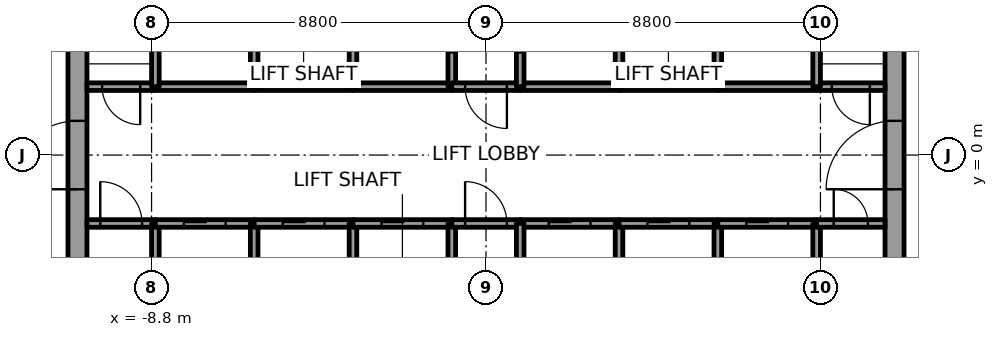
"""IFC4 building model, lengths in metres.
Left out: names, types, materials, properties, quantities, classifications, styles, units other than length and angle.
Written with IfcOpenShell. Run it as: python <this file> out.ifc"""

import sys

from ifc_helpers import new_model, si_unit, direction, frame, frame_2d, origin, place, context, subcontext, project, spatial, rectangle, extrude, element, fill, save


model = new_model("IFC4")
c1 = context("Model", 3, precision=1e-05, world=origin(), true_north=direction((0.0, 1.0)))
c2 = subcontext(c1, "Body", "Model", "MODEL_VIEW")
j1 = project(units=[si_unit("LENGTHUNIT", "METRE"), si_unit("PLANEANGLEUNIT", "RADIAN")], contexts=[c1])
p1 = place(None, origin())
s1 = spatial("IfcSite", under=j1, at=p1, CompositionType="ELEMENT")
p2 = place(p1, origin())
s2 = spatial("IfcBuilding", under=s1, at=p2, CompositionType="ELEMENT")
p3 = place(p2, frame((0.0, 0.0, 153.8)))
s3 = spatial("IfcBuildingStorey", under=s2, at=p3, CompositionType="ELEMENT", Elevation=153.8)
p4 = place(p3, frame((-10.75, -7.5, 0.0), z_axis=(0.0, 0.0, 1.0), x_axis=(0.0, 1.0, 0.0)))
e1 = element("IfcWall", 1, at=p4, inside=s3, PredefinedType="SHEAR", context=c2, shape_type="SweptSolid", body=[
    extrude(rectangle(XDim=15.0, YDim=0.5, at=frame_2d((7.5, 0.0))), origin(), (0.0, 0.0, 1.0), 4.0),
])
p5 = place(p4, frame((6.6, 0.0, 0.0)))
e2 = element("IfcOpeningElement", 2, at=p5, cuts=e1, PredefinedType="OPENING", context=c2, shape_type="SweptSolid", body=[
    extrude(rectangle(XDim=1.8, YDim=2.1, at=frame_2d((0.9, 1.05))), frame((0.0, 0.25, 0.0), z_axis=(0.0, -1.0, 0.0), x_axis=(1.0, 0.0, 0.0)), (0.0, 0.0, 1.0), 0.5),
])
p6 = place(p3, frame((10.75, -7.5, 0.0), z_axis=(0.0, 0.0, 1.0), x_axis=(0.0, 1.0, 0.0)))
e3 = element("IfcWall", 3, at=p6, inside=s3, PredefinedType="SHEAR", context=c2, shape_type="SweptSolid", body=[
    extrude(rectangle(XDim=15.0, YDim=0.5, at=frame_2d((7.5, 0.0))), origin(), (0.0, 0.0, 1.0), 4.0),
])
p7 = place(p6, frame((6.6, 0.0, 0.0)))
e4 = element("IfcOpeningElement", 4, at=p7, cuts=e3, PredefinedType="OPENING", context=c2, shape_type="SweptSolid", body=[
    extrude(rectangle(XDim=1.8, YDim=2.1, at=frame_2d((0.9, 1.05))), frame((0.0, 0.25, 0.0), z_axis=(0.0, -1.0, 0.0), x_axis=(1.0, 0.0, 0.0)), (0.0, 0.0, 1.0), 0.5),
])
p8 = place(p3, frame((-10.5, -1.8, 0.0), z_axis=(0.0, 0.0, 1.0), x_axis=(1.0, 0.0, 0.0)))
e5 = element("IfcWall", 5, at=p8, inside=s3, PredefinedType="SOLIDWALL", context=c2, shape_type="SweptSolid", body=[
    extrude(rectangle(XDim=1.8, YDim=0.2, at=frame_2d((0.9, 0.0))), origin(), (0.0, 0.0, 1.0), 3.85),
])
p9 = place(p8, frame((0.35, 0.0, 0.0)))
e6 = element("IfcOpeningElement", 6, at=p9, cuts=e5, PredefinedType="OPENING", context=c2, shape_type="SweptSolid", body=[
    extrude(rectangle(XDim=1.1, YDim=2.1, at=frame_2d((0.55, 1.05))), frame((0.0, 0.1, 0.0), z_axis=(0.0, -1.0, 0.0), x_axis=(1.0, 0.0, 0.0)), (0.0, 0.0, 1.0), 0.2),
])
p10 = place(p3, frame((-8.7, 1.8, 0.0), z_axis=(0.0, 0.0, 1.0), x_axis=(-1.0, 0.0, 0.0)))
e7 = element("IfcWall", 7, at=p10, inside=s3, PredefinedType="SOLIDWALL", context=c2, shape_type="SweptSolid", body=[
    extrude(rectangle(XDim=1.8, YDim=0.2, at=frame_2d((0.9, 0.0))), origin(), (0.0, 0.0, 1.0), 3.85),
])
p11 = place(p10, frame((0.4, 0.0, 0.0)))
e8 = element("IfcOpeningElement", 8, at=p11, cuts=e7, PredefinedType="OPENING", context=c2, shape_type="SweptSolid", body=[
    extrude(rectangle(XDim=1.0, YDim=2.1, at=frame_2d((0.5, 1.05))), frame((0.0, 0.1, 0.0), z_axis=(0.0, -1.0, 0.0), x_axis=(1.0, 0.0, 0.0)), (0.0, 0.0, 1.0), 0.2),
])
p12 = place(p3, frame((-8.7, -4.6, 0.0), z_axis=(0.0, 0.0, 1.0), x_axis=(0.0, 1.0, 0.0)))
e9 = element("IfcWall", 9, at=p12, inside=s3, PredefinedType="SOLIDWALL", context=c2, shape_type="SweptSolid", body=[
    extrude(rectangle(XDim=2.8, YDim=0.2, at=frame_2d((1.4, 0.0))), origin(), (0.0, 0.0, 1.0), 3.85),
])
p13 = place(p3, frame((-8.7, -1.8, 0.0), z_axis=(0.0, 0.0, 1.0), x_axis=(1.0, 0.0, 0.0)))
e10 = element("IfcWall", 10, at=p13, inside=s3, PredefinedType="SOLIDWALL", context=c2, shape_type="SweptSolid", body=[
    extrude(rectangle(XDim=2.6, YDim=0.2, at=frame_2d((1.3, 0.0))), origin(), (0.0, 0.0, 1.0), 3.85),
])
p14 = place(p13, frame((0.75, 0.0, 0.0)))
e11 = element("IfcOpeningElement", 11, at=p14, cuts=e10, PredefinedType="OPENING", context=c2, shape_type="SweptSolid", body=[
    extrude(rectangle(XDim=1.1, YDim=2.1, at=frame_2d((0.55, 1.05))), frame((0.0, 0.1, 0.0), z_axis=(0.0, -1.0, 0.0), x_axis=(1.0, 0.0, 0.0)), (0.0, 0.0, 1.0), 0.2),
])
p15 = place(p3, frame((-6.1, 1.8, 0.0), z_axis=(0.0, 0.0, 1.0), x_axis=(-1.0, 0.0, 0.0)))
e12 = element("IfcWall", 12, at=p15, inside=s3, PredefinedType="SOLIDWALL", context=c2, shape_type="SweptSolid", body=[
    extrude(rectangle(XDim=2.6, YDim=0.2, at=frame_2d((1.3, 0.0))), origin(), (0.0, 0.0, 1.0), 3.85),
])
for number, where, z_axis, x_axis in (
    (13, (-8.7, 1.8, 0.0), (0.0, 0.0, 1.0), (0.0, 1.0, 0.0)),
    (14, (-6.1, -4.6, 0.0), (0.0, 0.0, 1.0), (0.0, 1.0, 0.0)),
):
    element("IfcWall", number, at=place(p3, frame(where, z_axis=z_axis, x_axis=x_axis)), inside=s3, PredefinedType="SOLIDWALL", context=c2, shape_type="SweptSolid", body=[
        extrude(rectangle(XDim=2.8, YDim=0.2, at=frame_2d((1.4, 0.0))), origin(), (0.0, 0.0, 1.0), 3.85),
    ])
p16 = place(p3, frame((-6.1, -1.8, 0.0), z_axis=(0.0, 0.0, 1.0), x_axis=(1.0, 0.0, 0.0)))
e15 = element("IfcWall", 15, at=p16, inside=s3, PredefinedType="SOLIDWALL", context=c2, shape_type="SweptSolid", body=[
    extrude(rectangle(XDim=2.6, YDim=0.2, at=frame_2d((1.3, 0.0))), origin(), (0.0, 0.0, 1.0), 3.85),
])
p17 = place(p16, frame((0.75, 0.0, 0.0)))
e16 = element("IfcOpeningElement", 16, at=p17, cuts=e15, PredefinedType="OPENING", context=c2, shape_type="SweptSolid", body=[
    extrude(rectangle(XDim=1.1, YDim=2.1, at=frame_2d((0.55, 1.05))), frame((0.0, 0.1, 0.0), z_axis=(0.0, -1.0, 0.0), x_axis=(1.0, 0.0, 0.0)), (0.0, 0.0, 1.0), 0.2),
])
p18 = place(p3, frame((-3.5, 1.8, 0.0), z_axis=(0.0, 0.0, 1.0), x_axis=(-1.0, 0.0, 0.0)))
e17 = element("IfcWall", 17, at=p18, inside=s3, PredefinedType="SOLIDWALL", context=c2, shape_type="SweptSolid", body=[
    extrude(rectangle(XDim=2.6, YDim=0.2, at=frame_2d((1.3, 0.0))), origin(), (0.0, 0.0, 1.0), 3.85),
])
for number, where, z_axis, x_axis in (
    (18, (-6.1, 1.8, 0.0), (0.0, 0.0, 1.0), (0.0, 1.0, 0.0)),
    (19, (-3.5, -4.6, 0.0), (0.0, 0.0, 1.0), (0.0, 1.0, 0.0)),
):
    element("IfcWall", number, at=place(p3, frame(where, z_axis=z_axis, x_axis=x_axis)), inside=s3, PredefinedType="SOLIDWALL", context=c2, shape_type="SweptSolid", body=[
        extrude(rectangle(XDim=2.8, YDim=0.2, at=frame_2d((1.4, 0.0))), origin(), (0.0, 0.0, 1.0), 3.85),
    ])
p19 = place(p3, frame((-3.5, -1.8, 0.0), z_axis=(0.0, 0.0, 1.0), x_axis=(1.0, 0.0, 0.0)))
e20 = element("IfcWall", 20, at=p19, inside=s3, PredefinedType="SOLIDWALL", context=c2, shape_type="SweptSolid", body=[
    extrude(rectangle(XDim=2.6, YDim=0.2, at=frame_2d((1.3, 0.0))), origin(), (0.0, 0.0, 1.0), 3.85),
])
p20 = place(p19, frame((0.75, 0.0, 0.0)))
e21 = element("IfcOpeningElement", 21, at=p20, cuts=e20, PredefinedType="OPENING", context=c2, shape_type="SweptSolid", body=[
    extrude(rectangle(XDim=1.1, YDim=2.1, at=frame_2d((0.55, 1.05))), frame((0.0, 0.1, 0.0), z_axis=(0.0, -1.0, 0.0), x_axis=(1.0, 0.0, 0.0)), (0.0, 0.0, 1.0), 0.2),
])
p21 = place(p3, frame((-0.9, 1.8, 0.0), z_axis=(0.0, 0.0, 1.0), x_axis=(-1.0, 0.0, 0.0)))
e22 = element("IfcWall", 22, at=p21, inside=s3, PredefinedType="SOLIDWALL", context=c2, shape_type="SweptSolid", body=[
    extrude(rectangle(XDim=2.6, YDim=0.2, at=frame_2d((1.3, 0.0))), origin(), (0.0, 0.0, 1.0), 3.85),
])
p22 = place(p3, frame((-3.5, 4.6, 0.0), z_axis=(0.0, 0.0, 1.0), x_axis=(0.0, -1.0, 0.0)))
e23 = element("IfcWall", 23, at=p22, inside=s3, PredefinedType="SOLIDWALL", context=c2, shape_type="SweptSolid", body=[
    extrude(rectangle(XDim=2.8, YDim=0.2, at=frame_2d((1.4, 0.0))), origin(), (0.0, 0.0, 1.0), 3.85),
])
p23 = place(p3, frame((-0.9, 1.8, 0.0), z_axis=(0.0, 0.0, 1.0), x_axis=(0.0, 1.0, 0.0)))
e24 = element("IfcWall", 24, at=p23, inside=s3, PredefinedType="SOLIDWALL", context=c2, shape_type="SweptSolid", body=[
    extrude(rectangle(XDim=3.0, YDim=0.2, at=frame_2d((1.5, 0.0))), origin(), (0.0, 0.0, 1.0), 3.85),
])
p24 = place(p23, frame((0.9, 0.0, 0.0)))
e25 = element("IfcOpeningElement", 25, at=p24, cuts=e24, PredefinedType="OPENING", context=c2, shape_type="SweptSolid", body=[
    extrude(rectangle(XDim=1.2, YDim=2.1, at=frame_2d((0.6, 1.05))), frame((0.0, 0.1, 0.0), z_axis=(0.0, -1.0, 0.0), x_axis=(1.0, 0.0, 0.0)), (0.0, 0.0, 1.0), 0.2),
])
p25 = place(p3, frame((-0.9, -4.6, 0.0), z_axis=(0.0, 0.0, 1.0), x_axis=(0.0, 1.0, 0.0)))
e26 = element("IfcWall", 26, at=p25, inside=s3, PredefinedType="SOLIDWALL", context=c2, shape_type="SweptSolid", body=[
    extrude(rectangle(XDim=2.8, YDim=0.2, at=frame_2d((1.4, 0.0))), origin(), (0.0, 0.0, 1.0), 3.85),
])
p26 = place(p3, frame((-0.9, -1.8, 0.0), z_axis=(0.0, 0.0, 1.0), x_axis=(1.0, 0.0, 0.0)))
e27 = element("IfcWall", 27, at=p26, inside=s3, PredefinedType="SOLIDWALL", context=c2, shape_type="SweptSolid", body=[
    extrude(rectangle(XDim=1.8, YDim=0.2, at=frame_2d((0.9, 0.0))), origin(), (0.0, 0.0, 1.0), 3.85),
])
p27 = place(p26, frame((0.35, 0.0, 0.0)))
e28 = element("IfcOpeningElement", 28, at=p27, cuts=e27, PredefinedType="OPENING", context=c2, shape_type="SweptSolid", body=[
    extrude(rectangle(XDim=1.1, YDim=2.1, at=frame_2d((0.55, 1.05))), frame((0.0, 0.1, 0.0), z_axis=(0.0, -1.0, 0.0), x_axis=(1.0, 0.0, 0.0)), (0.0, 0.0, 1.0), 0.2),
])
p28 = place(p3, frame((0.9, 1.8, 0.0), z_axis=(0.0, 0.0, 1.0), x_axis=(-1.0, 0.0, 0.0)))
e29 = element("IfcWall", 29, at=p28, inside=s3, PredefinedType="SOLIDWALL", context=c2, shape_type="SweptSolid", body=[
    extrude(rectangle(XDim=1.8, YDim=0.2, at=frame_2d((0.9, 0.0))), origin(), (0.0, 0.0, 1.0), 3.85),
])
p29 = place(p28, frame((0.35, 0.0, 0.0)))
e30 = element("IfcOpeningElement", 30, at=p29, cuts=e29, PredefinedType="OPENING", context=c2, shape_type="SweptSolid", body=[
    extrude(rectangle(XDim=1.1, YDim=2.1, at=frame_2d((0.55, 1.05))), frame((0.0, 0.1, 0.0), z_axis=(0.0, -1.0, 0.0), x_axis=(1.0, 0.0, 0.0)), (0.0, 0.0, 1.0), 0.2),
])
p30 = place(p3, frame((0.9, -1.8, 0.0), z_axis=(0.0, 0.0, 1.0), x_axis=(1.0, 0.0, 0.0)))
e31 = element("IfcWall", 31, at=p30, inside=s3, PredefinedType="SOLIDWALL", context=c2, shape_type="SweptSolid", body=[
    extrude(rectangle(XDim=2.6, YDim=0.2, at=frame_2d((1.3, 0.0))), origin(), (0.0, 0.0, 1.0), 3.85),
])
p31 = place(p30, frame((0.75, 0.0, 0.0)))
e32 = element("IfcOpeningElement", 32, at=p31, cuts=e31, PredefinedType="OPENING", context=c2, shape_type="SweptSolid", body=[
    extrude(rectangle(XDim=1.1, YDim=2.1, at=frame_2d((0.55, 1.05))), frame((0.0, 0.1, 0.0), z_axis=(0.0, -1.0, 0.0), x_axis=(1.0, 0.0, 0.0)), (0.0, 0.0, 1.0), 0.2),
])
p32 = place(p3, frame((0.9, -1.8, 0.0), z_axis=(0.0, 0.0, 1.0), x_axis=(0.0, -1.0, 0.0)))
e33 = element("IfcWall", 33, at=p32, inside=s3, PredefinedType="SOLIDWALL", context=c2, shape_type="SweptSolid", body=[
    extrude(rectangle(XDim=2.8, YDim=0.2, at=frame_2d((1.4, 0.0))), origin(), (0.0, 0.0, 1.0), 3.85),
])
p33 = place(p3, frame((3.5, 1.8, 0.0), z_axis=(0.0, 0.0, 1.0), x_axis=(-1.0, 0.0, 0.0)))
e34 = element("IfcWall", 34, at=p33, inside=s3, PredefinedType="SOLIDWALL", context=c2, shape_type="SweptSolid", body=[
    extrude(rectangle(XDim=2.6, YDim=0.2, at=frame_2d((1.3, 0.0))), origin(), (0.0, 0.0, 1.0), 3.85),
])
p34 = place(p3, frame((0.9, 4.8, 0.0), z_axis=(0.0, 0.0, 1.0), x_axis=(0.0, -1.0, 0.0)))
e35 = element("IfcWall", 35, at=p34, inside=s3, PredefinedType="SOLIDWALL", context=c2, shape_type="SweptSolid", body=[
    extrude(rectangle(XDim=3.0, YDim=0.2, at=frame_2d((1.5, 0.0))), origin(), (0.0, 0.0, 1.0), 3.85),
])
p35 = place(p34, frame((0.9, 0.0, 0.0)))
e36 = element("IfcOpeningElement", 36, at=p35, cuts=e35, PredefinedType="OPENING", context=c2, shape_type="SweptSolid", body=[
    extrude(rectangle(XDim=1.2, YDim=2.1, at=frame_2d((0.6, 1.05))), frame((0.0, 0.1, 0.0), z_axis=(0.0, -1.0, 0.0), x_axis=(1.0, 0.0, 0.0)), (0.0, 0.0, 1.0), 0.2),
])
p36 = place(p3, frame((3.5, -4.6, 0.0), z_axis=(0.0, 0.0, 1.0), x_axis=(0.0, 1.0, 0.0)))
e37 = element("IfcWall", 37, at=p36, inside=s3, PredefinedType="SOLIDWALL", context=c2, shape_type="SweptSolid", body=[
    extrude(rectangle(XDim=2.8, YDim=0.2, at=frame_2d((1.4, 0.0))), origin(), (0.0, 0.0, 1.0), 3.85),
])
p37 = place(p3, frame((3.5, -1.8, 0.0), z_axis=(0.0, 0.0, 1.0), x_axis=(1.0, 0.0, 0.0)))
e38 = element("IfcWall", 38, at=p37, inside=s3, PredefinedType="SOLIDWALL", context=c2, shape_type="SweptSolid", body=[
    extrude(rectangle(XDim=2.6, YDim=0.2, at=frame_2d((1.3, 0.0))), origin(), (0.0, 0.0, 1.0), 3.85),
])
p38 = place(p37, frame((0.75, 0.0, 0.0)))
e39 = element("IfcOpeningElement", 39, at=p38, cuts=e38, PredefinedType="OPENING", context=c2, shape_type="SweptSolid", body=[
    extrude(rectangle(XDim=1.1, YDim=2.1, at=frame_2d((0.55, 1.05))), frame((0.0, 0.1, 0.0), z_axis=(0.0, -1.0, 0.0), x_axis=(1.0, 0.0, 0.0)), (0.0, 0.0, 1.0), 0.2),
])
p39 = place(p3, frame((6.1, 1.8, 0.0), z_axis=(0.0, 0.0, 1.0), x_axis=(-1.0, 0.0, 0.0)))
e40 = element("IfcWall", 40, at=p39, inside=s3, PredefinedType="SOLIDWALL", context=c2, shape_type="SweptSolid", body=[
    extrude(rectangle(XDim=2.6, YDim=0.2, at=frame_2d((1.3, 0.0))), origin(), (0.0, 0.0, 1.0), 3.85),
])
for number, where, z_axis, x_axis in (
    (41, (3.5, 1.8, 0.0), (0.0, 0.0, 1.0), (0.0, 1.0, 0.0)),
    (42, (6.1, -4.6, 0.0), (0.0, 0.0, 1.0), (0.0, 1.0, 0.0)),
):
    element("IfcWall", number, at=place(p3, frame(where, z_axis=z_axis, x_axis=x_axis)), inside=s3, PredefinedType="SOLIDWALL", context=c2, shape_type="SweptSolid", body=[
        extrude(rectangle(XDim=2.8, YDim=0.2, at=frame_2d((1.4, 0.0))), origin(), (0.0, 0.0, 1.0), 3.85),
    ])
p40 = place(p3, frame((6.1, -1.8, 0.0), z_axis=(0.0, 0.0, 1.0), x_axis=(1.0, 0.0, 0.0)))
e43 = element("IfcWall", 43, at=p40, inside=s3, PredefinedType="SOLIDWALL", context=c2, shape_type="SweptSolid", body=[
    extrude(rectangle(XDim=2.6, YDim=0.2, at=frame_2d((1.3, 0.0))), origin(), (0.0, 0.0, 1.0), 3.85),
])
p41 = place(p40, frame((0.75, 0.0, 0.0)))
e44 = element("IfcOpeningElement", 44, at=p41, cuts=e43, PredefinedType="OPENING", context=c2, shape_type="SweptSolid", body=[
    extrude(rectangle(XDim=1.1, YDim=2.1, at=frame_2d((0.55, 1.05))), frame((0.0, 0.1, 0.0), z_axis=(0.0, -1.0, 0.0), x_axis=(1.0, 0.0, 0.0)), (0.0, 0.0, 1.0), 0.2),
])
p42 = place(p3, frame((8.7, 1.8, 0.0), z_axis=(0.0, 0.0, 1.0), x_axis=(-1.0, 0.0, 0.0)))
e45 = element("IfcWall", 45, at=p42, inside=s3, PredefinedType="SOLIDWALL", context=c2, shape_type="SweptSolid", body=[
    extrude(rectangle(XDim=2.6, YDim=0.2, at=frame_2d((1.3, 0.0))), origin(), (0.0, 0.0, 1.0), 3.85),
])
for number, where, z_axis, x_axis in (
    (46, (6.1, 1.8, 0.0), (0.0, 0.0, 1.0), (0.0, 1.0, 0.0)),
    (47, (8.7, -1.8, 0.0), (0.0, 0.0, 1.0), (0.0, -1.0, 0.0)),
):
    element("IfcWall", number, at=place(p3, frame(where, z_axis=z_axis, x_axis=x_axis)), inside=s3, PredefinedType="SOLIDWALL", context=c2, shape_type="SweptSolid", body=[
        extrude(rectangle(XDim=2.8, YDim=0.2, at=frame_2d((1.4, 0.0))), origin(), (0.0, 0.0, 1.0), 3.85),
    ])
p43 = place(p3, frame((8.7, -1.8, 0.0), z_axis=(0.0, 0.0, 1.0), x_axis=(1.0, 0.0, 0.0)))
e48 = element("IfcWall", 48, at=p43, inside=s3, PredefinedType="SOLIDWALL", context=c2, shape_type="SweptSolid", body=[
    extrude(rectangle(XDim=1.8, YDim=0.2, at=frame_2d((0.9, 0.0))), origin(), (0.0, 0.0, 1.0), 3.85),
])
p44 = place(p43, frame((0.45, 0.0, 0.0)))
e49 = element("IfcOpeningElement", 49, at=p44, cuts=e48, PredefinedType="OPENING", context=c2, shape_type="SweptSolid", body=[
    extrude(rectangle(XDim=0.9, YDim=2.1, at=frame_2d((0.45, 1.05))), frame((0.0, 0.1, 0.0), z_axis=(0.0, -1.0, 0.0), x_axis=(1.0, 0.0, 0.0)), (0.0, 0.0, 1.0), 0.2),
])
p45 = place(p3, frame((10.5, 1.8, 0.0), z_axis=(0.0, 0.0, 1.0), x_axis=(-1.0, 0.0, 0.0)))
e50 = element("IfcWall", 50, at=p45, inside=s3, PredefinedType="SOLIDWALL", context=c2, shape_type="SweptSolid", body=[
    extrude(rectangle(XDim=1.8, YDim=0.2, at=frame_2d((0.9, 0.0))), origin(), (0.0, 0.0, 1.0), 3.85),
])
p46 = place(p45, frame((0.4, 0.0, 0.0)))
e51 = element("IfcOpeningElement", 51, at=p46, cuts=e50, PredefinedType="OPENING", context=c2, shape_type="SweptSolid", body=[
    extrude(rectangle(XDim=1.0, YDim=2.1, at=frame_2d((0.5, 1.05))), frame((0.0, 0.1, 0.0), z_axis=(0.0, -1.0, 0.0), x_axis=(1.0, 0.0, 0.0)), (0.0, 0.0, 1.0), 0.2),
])
p47 = place(p3, frame((8.7, 4.6, 0.0), z_axis=(0.0, 0.0, 1.0), x_axis=(0.0, -1.0, 0.0)))
e52 = element("IfcWall", 52, at=p47, inside=s3, PredefinedType="SOLIDWALL", context=c2, shape_type="SweptSolid", body=[
    extrude(rectangle(XDim=2.8, YDim=0.2, at=frame_2d((1.4, 0.0))), origin(), (0.0, 0.0, 1.0), 3.85),
])
p48 = place(p14, origin())
e53 = element("IfcDoor", 53, at=p48, inside=s3, OperationType="SLIDING_TO_RIGHT", PredefinedType="DOOR", context=c2, shape_type="SweptSolid", body=[
    extrude(rectangle(XDim=1.1, YDim=2.1, at=frame_2d((0.55, 1.05))), frame((0.0, 0.025, 0.0), z_axis=(0.0, -1.0, 0.0), x_axis=(1.0, 0.0, 0.0)), (0.0, 0.0, 1.0), 0.05),
])
fill(e11, e53)
p49 = place(p17, origin())
e54 = element("IfcDoor", 54, at=p49, inside=s3, OperationType="SLIDING_TO_LEFT", PredefinedType="DOOR", context=c2, shape_type="SweptSolid", body=[
    extrude(rectangle(XDim=1.1, YDim=2.1, at=frame_2d((0.55, 1.05))), frame((0.0, 0.025, 0.0), z_axis=(0.0, -1.0, 0.0), x_axis=(1.0, 0.0, 0.0)), (0.0, 0.0, 1.0), 0.05),
])
fill(e16, e54)
p50 = place(p20, origin())
e55 = element("IfcDoor", 55, at=p50, inside=s3, OperationType="SLIDING_TO_RIGHT", PredefinedType="DOOR", context=c2, shape_type="SweptSolid", body=[
    extrude(rectangle(XDim=1.1, YDim=2.1, at=frame_2d((0.55, 1.05))), frame((0.0, 0.025, 0.0), z_axis=(0.0, -1.0, 0.0), x_axis=(1.0, 0.0, 0.0)), (0.0, 0.0, 1.0), 0.05),
])
fill(e21, e55)
p51 = place(p31, origin())
e56 = element("IfcDoor", 56, at=p51, inside=s3, OperationType="SLIDING_TO_RIGHT", PredefinedType="DOOR", context=c2, shape_type="SweptSolid", body=[
    extrude(rectangle(XDim=1.1, YDim=2.1, at=frame_2d((0.55, 1.05))), frame((0.0, 0.025, 0.0), z_axis=(0.0, -1.0, 0.0), x_axis=(1.0, 0.0, 0.0)), (0.0, 0.0, 1.0), 0.05),
])
fill(e32, e56)
p52 = place(p38, origin())
e57 = element("IfcDoor", 57, at=p52, inside=s3, OperationType="SLIDING_TO_LEFT", PredefinedType="DOOR", context=c2, shape_type="SweptSolid", body=[
    extrude(rectangle(XDim=1.1, YDim=2.1, at=frame_2d((0.55, 1.05))), frame((0.0, 0.025, 0.0), z_axis=(0.0, -1.0, 0.0), x_axis=(1.0, 0.0, 0.0)), (0.0, 0.0, 1.0), 0.05),
])
fill(e39, e57)
p53 = place(p41, origin())
e58 = element("IfcDoor", 58, at=p53, inside=s3, OperationType="SLIDING_TO_LEFT", PredefinedType="DOOR", context=c2, shape_type="SweptSolid", body=[
    extrude(rectangle(XDim=1.1, YDim=2.1, at=frame_2d((0.55, 1.05))), frame((0.0, 0.025, 0.0), z_axis=(0.0, -1.0, 0.0), x_axis=(1.0, 0.0, 0.0)), (0.0, 0.0, 1.0), 0.05),
])
fill(e44, e58)
p54 = place(p9, origin())
e59 = element("IfcDoor", 59, at=p54, inside=s3, OperationType="SINGLE_SWING_RIGHT", PredefinedType="DOOR", context=c2, shape_type="SweptSolid", body=[
    extrude(rectangle(XDim=1.1, YDim=2.1, at=frame_2d((0.55, 1.05))), frame((0.0, 0.025, 0.0), z_axis=(0.0, -1.0, 0.0), x_axis=(1.0, 0.0, 0.0)), (0.0, 0.0, 1.0), 0.05),
])
fill(e6, e59)
p55 = place(p29, origin())
e60 = element("IfcDoor", 60, at=p55, inside=s3, OperationType="SINGLE_SWING_LEFT", PredefinedType="DOOR", context=c2, shape_type="SweptSolid", body=[
    extrude(rectangle(XDim=1.1, YDim=2.1, at=frame_2d((0.55, 1.05))), frame((0.0, 0.025, 0.0), z_axis=(0.0, -1.0, 0.0), x_axis=(1.0, 0.0, 0.0)), (0.0, 0.0, 1.0), 0.05),
])
fill(e30, e60)
p56 = place(p27, origin())
e61 = element("IfcDoor", 61, at=p56, inside=s3, OperationType="SINGLE_SWING_RIGHT", PredefinedType="DOOR", context=c2, shape_type="SweptSolid", body=[
    extrude(rectangle(XDim=1.1, YDim=2.1, at=frame_2d((0.55, 1.05))), frame((0.0, 0.025, 0.0), z_axis=(0.0, -1.0, 0.0), x_axis=(1.0, 0.0, 0.0)), (0.0, 0.0, 1.0), 0.05),
])
fill(e28, e61)
p57 = place(p11, origin())
e62 = element("IfcDoor", 62, at=p57, inside=s3, OperationType="SINGLE_SWING_LEFT", PredefinedType="DOOR", context=c2, shape_type="SweptSolid", body=[
    extrude(rectangle(XDim=1.0, YDim=2.1, at=frame_2d((0.5, 1.05))), frame((0.0, 0.025, 0.0), z_axis=(0.0, -1.0, 0.0), x_axis=(1.0, 0.0, 0.0)), (0.0, 0.0, 1.0), 0.05),
])
fill(e8, e62)
p58 = place(p46, origin())
e63 = element("IfcDoor", 63, at=p58, inside=s3, OperationType="SINGLE_SWING_RIGHT", PredefinedType="DOOR", context=c2, shape_type="SweptSolid", body=[
    extrude(rectangle(XDim=1.0, YDim=2.1, at=frame_2d((0.5, 1.05))), frame((0.0, 0.025, 0.0), z_axis=(0.0, -1.0, 0.0), x_axis=(1.0, 0.0, 0.0)), (0.0, 0.0, 1.0), 0.05),
])
fill(e51, e63)
p59 = place(p44, origin())
e64 = element("IfcDoor", 64, at=p59, inside=s3, OperationType="SINGLE_SWING_LEFT", PredefinedType="DOOR", context=c2, shape_type="SweptSolid", body=[
    extrude(rectangle(XDim=0.9, YDim=2.1, at=frame_2d((0.45, 1.05))), frame((0.0, 0.025, 0.0), z_axis=(0.0, -1.0, 0.0), x_axis=(1.0, 0.0, 0.0)), (0.0, 0.0, 1.0), 0.05),
])
fill(e49, e64)
p60 = place(p5, origin())
e65 = element("IfcDoor", 65, at=p60, inside=s3, OperationType="DOUBLE_DOOR_SINGLE_SWING", PredefinedType="DOOR", context=c2, shape_type="SweptSolid", body=[
    extrude(rectangle(XDim=1.8, YDim=2.1, at=frame_2d((0.9, 1.05))), frame((0.0, 0.025, 0.0), z_axis=(0.0, -1.0, 0.0), x_axis=(1.0, 0.0, 0.0)), (0.0, 0.0, 1.0), 0.05),
])
fill(e2, e65)
p61 = place(p7, origin())
e66 = element("IfcDoor", 66, at=p61, inside=s3, OperationType="DOUBLE_DOOR_SINGLE_SWING", PredefinedType="DOOR", context=c2, shape_type="SweptSolid", body=[
    extrude(rectangle(XDim=1.8, YDim=2.1, at=frame_2d((0.9, 1.05))), frame((0.0, 0.025, 0.0), z_axis=(0.0, -1.0, 0.0), x_axis=(1.0, 0.0, 0.0)), (0.0, 0.0, 1.0), 0.05),
])
fill(e4, e66)
save(model, sys.argv[1])
